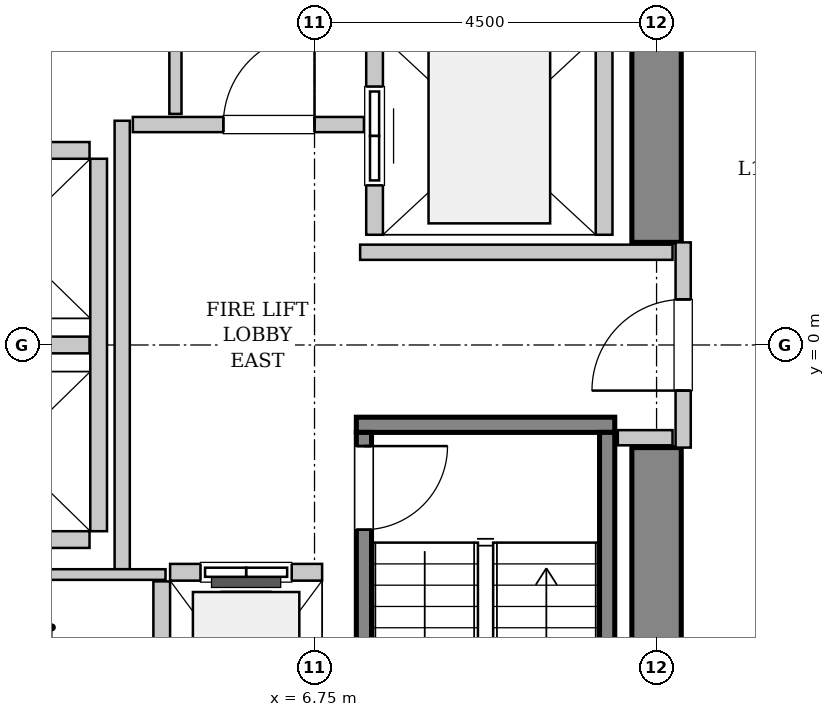
"""IFC4 building model, lengths in metres.
Left out: names, types, materials, properties, quantities, classifications, styles, units other than length and angle.
Written with IfcOpenShell. Run it as: python <this file> out.ifc"""

import sys

from ifc_helpers import new_model, si_unit, direction, frame, frame_2d, origin, place, context, subcontext, project, spatial, rectangle, extrude, source, transform, mapped, element, fill, save


model = new_model("IFC4")
c1 = context("Model", 3, precision=1e-05, world=origin(), true_north=direction((0.0, 1.0)))
c2 = subcontext(c1, "Body", "Model", "MODEL_VIEW")
j1 = project(units=[si_unit("LENGTHUNIT", "METRE"), si_unit("PLANEANGLEUNIT", "RADIAN")], contexts=[c1])
p1 = place(None, origin())
s1 = spatial("IfcSite", under=j1, at=p1, CompositionType="ELEMENT")
p2 = place(p1, origin())
s2 = spatial("IfcBuilding", under=s1, at=p2, CompositionType="ELEMENT")
p3 = place(p2, frame((0.0, 0.0, 71.0)))
s3 = spatial("IfcBuildingStorey", under=s2, at=p3, CompositionType="ELEMENT", Elevation=71.0)
m1 = source(origin(), c2, "Body", "SweptSolid", [
    extrude(rectangle(XDim=7.325, YDim=0.65, at=frame_2d((3.663, 0.0))), origin(), (0.0, 0.0, 1.0), 3.8),
])
for number, where, z_axis, x_axis in (
    (1, (11.25, -8.675, 0.0), (0.0, 0.0, 1.0), (0.0, 1.0, 0.0)),
    (2, (11.25, 1.35, 0.0), (0.0, 0.0, 1.0), (0.0, 1.0, 0.0)),
):
    element("IfcWall", number, at=place(p3, frame(where, z_axis=z_axis, x_axis=x_axis)), inside=s3, PredefinedType="SHEAR", context=c2, shape_type="MappedRepresentation", body=[
        mapped(m1, transform((0.0, 0.0, 0.0), x_axis=(1.0, 0.0, 0.0), y_axis=(0.0, 1.0, 0.0), z_axis=(0.0, 0.0, 1.0), scale=1.0)),
    ])
m2 = source(origin(), c2, "Body", "SweptSolid", [
    extrude(rectangle(XDim=3.4, YDim=0.2, at=frame_2d((1.7, 0.0))), origin(), (0.0, 0.0, 1.0), 3.8),
])
p4 = place(p3, frame((7.3, -1.05, 0.0), z_axis=(0.0, 0.0, 1.0), x_axis=(1.0, 0.0, 0.0)))
e3 = element("IfcWall", 3, at=p4, inside=s3, PredefinedType="SOLIDWALL", context=c2, shape_type="MappedRepresentation", body=[
    mapped(m2, transform((0.0, 0.0, 0.0), x_axis=(1.0, 0.0, 0.0), y_axis=(0.0, 1.0, 0.0), z_axis=(0.0, 0.0, 1.0), scale=1.0)),
])
m3 = source(origin(), c2, "Body", "SweptSolid", [
    extrude(rectangle(XDim=7.1, YDim=0.2, at=frame_2d((3.55, 0.0))), origin(), (0.0, 0.0, 1.0), 3.8),
])
p5 = place(p3, frame((7.4, -1.15, 0.0), z_axis=(0.0, 0.0, 1.0), x_axis=(0.0, -1.0, 0.0)))
e4 = element("IfcWall", 4, at=p5, inside=s3, PredefinedType="SOLIDWALL", context=c2, shape_type="MappedRepresentation", body=[
    mapped(m3, transform((0.0, 0.0, 0.0), x_axis=(1.0, 0.0, 0.0), y_axis=(0.0, 1.0, 0.0), z_axis=(0.0, 0.0, 1.0), scale=1.0)),
])
p6 = place(p5, frame((0.18, 0.0, 0.0)))
e5 = element("IfcOpeningElement", 5, at=p6, cuts=e4, PredefinedType="OPENING", context=c2, shape_type="SweptSolid", body=[
    extrude(rectangle(XDim=1.1, YDim=2.15, at=frame_2d((0.55, 1.075))), frame((0.0, 0.11, 0.0), z_axis=(0.0, -1.0, 0.0), x_axis=(1.0, 0.0, 0.0)), (0.0, 0.0, 1.0), 0.22),
])
p7 = place(p3, frame((10.6, -1.15, 0.0), z_axis=(0.0, 0.0, 1.0), x_axis=(0.0, -1.0, 0.0)))
e6 = element("IfcWall", 6, at=p7, inside=s3, PredefinedType="SOLIDWALL", context=c2, shape_type="MappedRepresentation", body=[
    mapped(m3, transform((0.0, 0.0, 0.0), x_axis=(1.0, 0.0, 0.0), y_axis=(0.0, 1.0, 0.0), z_axis=(0.0, 0.0, 1.0), scale=1.0)),
])
m4 = source(origin(), c2, "Body", "SweptSolid", [
    extrude(rectangle(XDim=2.0, YDim=0.22, at=frame_2d((1.0, 0.0))), origin(), (0.0, 0.0, 1.0), 3.535),
])
p8 = place(p3, frame((6.85, -2.99, 0.0), z_axis=(0.0, 0.0, 1.0), x_axis=(-1.0, 0.0, 0.0)))
e7 = element("IfcWall", 7, at=p8, inside=s3, PredefinedType="SOLIDWALL", context=c2, shape_type="MappedRepresentation", body=[
    mapped(m4, transform((0.0, 0.0, 0.0), x_axis=(1.0, 0.0, 0.0), y_axis=(0.0, 1.0, 0.0), z_axis=(0.0, 0.0, 1.0), scale=1.0)),
])
p9 = place(p8, frame((0.4, 0.0, 0.0)))
e8 = element("IfcOpeningElement", 8, at=p9, cuts=e7, PredefinedType="OPENING", context=c2, shape_type="SweptSolid", body=[
    extrude(rectangle(XDim=1.2, YDim=2.2, at=frame_2d((0.6, 1.1))), frame((0.0, 0.12, 0.0), z_axis=(0.0, -1.0, 0.0), x_axis=(1.0, 0.0, 0.0)), (0.0, 0.0, 1.0), 0.24),
])
m5 = source(origin(), c2, "Body", "SweptSolid", [
    extrude(rectangle(XDim=2.68, YDim=0.22, at=frame_2d((1.34, 0.0))), origin(), (0.0, 0.0, 1.0), 3.535),
])
p10 = place(p3, frame((4.74, -3.11, 0.0), z_axis=(0.0, 0.0, 1.0), x_axis=(0.0, -1.0, 0.0)))
e9 = element("IfcWall", 9, at=p10, inside=s3, PredefinedType="SOLIDWALL", context=c2, shape_type="MappedRepresentation", body=[
    mapped(m5, transform((0.0, 0.0, 0.0), x_axis=(1.0, 0.0, 0.0), y_axis=(0.0, 1.0, 0.0), z_axis=(0.0, 0.0, 1.0), scale=1.0)),
])
m6 = source(origin(), c2, "Body", "SweptSolid", [
    extrude(rectangle(XDim=5.45, YDim=0.22, at=frame_2d((2.725, 0.0))), origin(), (0.0, 0.0, 1.0), 3.535),
])
p11 = place(p3, frame((7.54, 6.9, 0.0), z_axis=(0.0, 0.0, 1.0), x_axis=(0.0, -1.0, 0.0)))
e10 = element("IfcWall", 10, at=p11, inside=s3, PredefinedType="SOLIDWALL", context=c2, shape_type="MappedRepresentation", body=[
    mapped(m6, transform((0.0, 0.0, 0.0), x_axis=(1.0, 0.0, 0.0), y_axis=(0.0, 1.0, 0.0), z_axis=(0.0, 0.0, 1.0), scale=1.0)),
])
p12 = place(p11, frame((3.5, 0.0, 0.0)))
e11 = element("IfcOpeningElement", 11, at=p12, cuts=e10, PredefinedType="OPENING", context=c2, shape_type="SweptSolid", body=[
    extrude(rectangle(XDim=1.3, YDim=2.3, at=frame_2d((0.65, 1.15))), frame((0.0, 0.12, 0.0), z_axis=(0.0, -1.0, 0.0), x_axis=(1.0, 0.0, 0.0)), (0.0, 0.0, 1.0), 0.24),
])
p13 = place(p11, frame((0.65, 0.0, 0.0)))
e12 = element("IfcOpeningElement", 12, at=p13, cuts=e10, PredefinedType="OPENING", context=c2, shape_type="SweptSolid", body=[
    extrude(rectangle(XDim=1.3, YDim=2.3, at=frame_2d((0.65, 1.15))), frame((0.0, 0.12, 0.0), z_axis=(0.0, -1.0, 0.0), x_axis=(1.0, 0.0, 0.0)), (0.0, 0.0, 1.0), 0.24),
])
p14 = place(p3, frame((10.56, 1.45, 0.0), z_axis=(0.0, 0.0, 1.0), x_axis=(0.0, 1.0, 0.0)))
e13 = element("IfcWall", 13, at=p14, inside=s3, PredefinedType="SOLIDWALL", context=c2, shape_type="MappedRepresentation", body=[
    mapped(m6, transform((0.0, 0.0, 0.0), x_axis=(1.0, 0.0, 0.0), y_axis=(0.0, 1.0, 0.0), z_axis=(0.0, 0.0, 1.0), scale=1.0)),
])
m7 = source(origin(), c2, "Body", "SweptSolid", [
    extrude(rectangle(XDim=4.9, YDim=0.22, at=frame_2d((2.45, 0.0))), origin(), (0.0, 0.0, 1.0), 3.535),
])
p15 = place(p3, frame((3.91, -2.45, 0.0), z_axis=(0.0, 0.0, 1.0), x_axis=(0.0, 1.0, 0.0)))
e14 = element("IfcWall", 14, at=p15, inside=s3, PredefinedType="SOLIDWALL", context=c2, shape_type="MappedRepresentation", body=[
    mapped(m7, transform((0.0, 0.0, 0.0), x_axis=(1.0, 0.0, 0.0), y_axis=(0.0, 1.0, 0.0), z_axis=(0.0, 0.0, 1.0), scale=1.0)),
])
m8 = source(origin(), c2, "Body", "SweptSolid", [
    extrude(rectangle(XDim=2.13, YDim=0.22, at=frame_2d((1.065, 0.0))), origin(), (0.0, 0.0, 1.0), 3.535),
])
for number, where, z_axis, x_axis in (
    (15, (1.66, -2.56, 0.0), (0.0, 0.0, 1.0), (1.0, 0.0, 0.0)),
    (16, (1.66, 0.0, 0.0), (0.0, 0.0, 1.0), (1.0, 0.0, 0.0)),
    (17, (3.79, 2.56, 0.0), (0.0, 0.0, 1.0), (-1.0, 0.0, 0.0)),
):
    element("IfcWall", number, at=place(p3, frame(where, z_axis=z_axis, x_axis=x_axis)), inside=s3, PredefinedType="SOLIDWALL", context=c2, shape_type="MappedRepresentation", body=[
        mapped(m8, transform((0.0, 0.0, 0.0), x_axis=(1.0, 0.0, 0.0), y_axis=(0.0, 1.0, 0.0), z_axis=(0.0, 0.0, 1.0), scale=1.0)),
    ])
m9 = source(origin(), c2, "Body", "SweptSolid", [
    extrude(rectangle(XDim=2.7, YDim=0.2, at=frame_2d((1.35, 0.0))), origin(), (0.0, 0.0, 1.0), 2.425),
])
p16 = place(p3, frame((11.6, -1.35, 0.0), z_axis=(0.0, 0.0, 1.0), x_axis=(0.0, 1.0, 0.0)))
e18 = element("IfcWall", 18, at=p16, inside=s3, PredefinedType="PARTITIONING", context=c2, shape_type="MappedRepresentation", body=[
    mapped(m9, transform((0.0, 0.0, 0.0), x_axis=(1.0, 0.0, 0.0), y_axis=(0.0, 1.0, 0.0), z_axis=(0.0, 0.0, 1.0), scale=1.0)),
])
p17 = place(p16, frame((0.75, 0.0, 0.0)))
e19 = element("IfcOpeningElement", 19, at=p17, cuts=e18, PredefinedType="OPENING", context=c2, shape_type="SweptSolid", body=[
    extrude(rectangle(XDim=1.2, YDim=2.15, at=frame_2d((0.6, 1.075))), frame((0.0, 0.11, 0.0), z_axis=(0.0, -1.0, 0.0), x_axis=(1.0, 0.0, 0.0)), (0.0, 0.0, 1.0), 0.22),
])
m10 = source(origin(), c2, "Body", "SweptSolid", [
    extrude(rectangle(XDim=5.9, YDim=0.2, at=frame_2d((2.95, 0.0))), origin(), (0.0, 0.0, 1.0), 3.535),
])
p18 = place(p3, frame((4.22, -2.95, 0.0), z_axis=(0.0, 0.0, 1.0), x_axis=(0.0, 1.0, 0.0)))
e20 = element("IfcWall", 20, at=p18, inside=s3, PredefinedType="PARTITIONING", context=c2, shape_type="MappedRepresentation", body=[
    mapped(m10, transform((0.0, 0.0, 0.0), x_axis=(1.0, 0.0, 0.0), y_axis=(0.0, 1.0, 0.0), z_axis=(0.0, 0.0, 1.0), scale=1.0)),
])
m11 = source(origin(), c2, "Body", "SweptSolid", [
    extrude(rectangle(XDim=3.04, YDim=0.2, at=frame_2d((1.52, 0.0))), origin(), (0.0, 0.0, 1.0), 3.535),
])
p19 = place(p3, frame((4.36, 2.9, 0.0), z_axis=(0.0, 0.0, 1.0), x_axis=(1.0, 0.0, 0.0)))
e21 = element("IfcWall", 21, at=p19, inside=s3, PredefinedType="PARTITIONING", context=c2, shape_type="MappedRepresentation", body=[
    mapped(m11, transform((0.0, 0.0, 0.0), x_axis=(1.0, 0.0, 0.0), y_axis=(0.0, 1.0, 0.0), z_axis=(0.0, 0.0, 1.0), scale=1.0)),
])
p20 = place(p19, frame((1.19, 0.0, 0.0)))
e22 = element("IfcOpeningElement", 22, at=p20, cuts=e21, PredefinedType="OPENING", context=c2, shape_type="SweptSolid", body=[
    extrude(rectangle(XDim=1.2, YDim=2.15, at=frame_2d((0.6, 1.075))), frame((0.0, 0.11, 0.0), z_axis=(0.0, -1.0, 0.0), x_axis=(1.0, 0.0, 0.0)), (0.0, 0.0, 1.0), 0.22),
])
m12 = source(origin(), c2, "Body", "SweptSolid", [
    extrude(rectangle(XDim=4.11, YDim=0.2, at=frame_2d((2.055, 0.0))), origin(), (0.0, 0.0, 1.0), 3.535),
])
p21 = place(p3, frame((7.35, 1.22, 0.0), z_axis=(0.0, 0.0, 1.0), x_axis=(1.0, 0.0, 0.0)))
e23 = element("IfcWall", 23, at=p21, inside=s3, PredefinedType="PARTITIONING", context=c2, shape_type="MappedRepresentation", body=[
    mapped(m12, transform((0.0, 0.0, 0.0), x_axis=(1.0, 0.0, 0.0), y_axis=(0.0, 1.0, 0.0), z_axis=(0.0, 0.0, 1.0), scale=1.0)),
])
m13 = source(origin(), c2, "Body", "SweptSolid", [
    extrude(rectangle(XDim=0.72, YDim=0.2, at=frame_2d((0.36, 0.0))), origin(), (0.0, 0.0, 1.0), 3.535),
])
p22 = place(p3, frame((10.74, -1.22, 0.0), z_axis=(0.0, 0.0, 1.0), x_axis=(1.0, 0.0, 0.0)))
e24 = element("IfcWall", 24, at=p22, inside=s3, PredefinedType="PARTITIONING", context=c2, shape_type="MappedRepresentation", body=[
    mapped(m13, transform((0.0, 0.0, 0.0), x_axis=(1.0, 0.0, 0.0), y_axis=(0.0, 1.0, 0.0), z_axis=(0.0, 0.0, 1.0), scale=1.0)),
])
m14 = source(origin(), c2, "Body", "SweptSolid", [
    extrude(rectangle(XDim=3.015, YDim=0.16, at=frame_2d((1.507, 0.0))), origin(), (0.0, 0.0, 1.0), 3.535),
])
p23 = place(p3, frame((4.92, 3.04, 0.0), z_axis=(0.0, 0.0, 1.0), x_axis=(0.0, 1.0, 0.0)))
e25 = element("IfcWall", 25, at=p23, inside=s3, PredefinedType="PARTITIONING", context=c2, shape_type="MappedRepresentation", body=[
    mapped(m14, transform((0.0, 0.0, 0.0), x_axis=(1.0, 0.0, 0.0), y_axis=(0.0, 1.0, 0.0), z_axis=(0.0, 0.0, 1.0), scale=1.0)),
])
m15 = source(origin(), c2, "Body", "SweptSolid", [
    extrude(rectangle(XDim=3.15, YDim=0.14, at=frame_2d((1.575, 0.0))), origin(), (0.0, 0.0, 1.0), 3.535),
])
p24 = place(p3, frame((1.64, -3.02, 0.0), z_axis=(0.0, 0.0, 1.0), x_axis=(1.0, 0.0, 0.0)))
e26 = element("IfcWall", 26, at=p24, inside=s3, PredefinedType="PARTITIONING", context=c2, shape_type="MappedRepresentation", body=[
    mapped(m15, transform((0.0, 0.0, 0.0), x_axis=(1.0, 0.0, 0.0), y_axis=(0.0, 1.0, 0.0), z_axis=(0.0, 0.0, 1.0), scale=1.0)),
])
m16 = source(origin(), c2, "Body", "SweptSolid", [
    extrude(rectangle(XDim=1.1, YDim=2.15, at=frame_2d((0.55, 1.075))), frame((0.0, 0.025, 0.0), z_axis=(0.0, -1.0, 0.0), x_axis=(1.0, 0.0, 0.0)), (0.0, 0.0, 1.0), 0.05),
])
p25 = place(p6, origin())
e27 = element("IfcDoor", 27, at=p25, inside=s3, OperationType="SINGLE_SWING_LEFT", PredefinedType="DOOR", context=c2, shape_type="MappedRepresentation", body=[
    mapped(m16, transform((0.0, 0.0, 0.0), x_axis=(1.0, 0.0, 0.0), y_axis=(0.0, 1.0, 0.0), z_axis=(0.0, 0.0, 1.0), scale=1.0)),
])
fill(e5, e27)
m17 = source(origin(), c2, "Body", "SweptSolid", [
    extrude(rectangle(XDim=1.2, YDim=2.2, at=frame_2d((0.6, 1.1))), frame((0.0, 0.025, 0.0), z_axis=(0.0, -1.0, 0.0), x_axis=(1.0, 0.0, 0.0)), (0.0, 0.0, 1.0), 0.05),
])
p26 = place(p9, origin())
e28 = element("IfcDoor", 28, at=p26, inside=s3, OperationType="SLIDING_TO_LEFT", PredefinedType="DOOR", context=c2, shape_type="MappedRepresentation", body=[
    mapped(m17, transform((0.0, 0.0, 0.0), x_axis=(1.0, 0.0, 0.0), y_axis=(0.0, 1.0, 0.0), z_axis=(0.0, 0.0, 1.0), scale=1.0)),
])
fill(e8, e28)
m18 = source(origin(), c2, "Body", "SweptSolid", [
    extrude(rectangle(XDim=1.3, YDim=2.3, at=frame_2d((0.65, 1.15))), frame((0.0, 0.025, 0.0), z_axis=(0.0, -1.0, 0.0), x_axis=(1.0, 0.0, 0.0)), (0.0, 0.0, 1.0), 0.05),
])
p27 = place(p12, origin())
e29 = element("IfcDoor", 29, at=p27, inside=s3, OperationType="SLIDING_TO_RIGHT", PredefinedType="DOOR", context=c2, shape_type="MappedRepresentation", body=[
    mapped(m18, transform((0.0, 0.0, 0.0), x_axis=(1.0, 0.0, 0.0), y_axis=(0.0, 1.0, 0.0), z_axis=(0.0, 0.0, 1.0), scale=1.0)),
])
fill(e11, e29)
m19 = source(origin(), c2, "Body", "SweptSolid", [
    extrude(rectangle(XDim=1.2, YDim=2.15, at=frame_2d((0.6, 1.075))), frame((0.0, 0.025, 0.0), z_axis=(0.0, -1.0, 0.0), x_axis=(1.0, 0.0, 0.0)), (0.0, 0.0, 1.0), 0.05),
])
p28 = place(p17, origin())
e30 = element("IfcDoor", 30, at=p28, inside=s3, OperationType="SINGLE_SWING_LEFT", PredefinedType="DOOR", context=c2, shape_type="MappedRepresentation", body=[
    mapped(m19, transform((0.0, 0.0, 0.0), x_axis=(1.0, 0.0, 0.0), y_axis=(0.0, 1.0, 0.0), z_axis=(0.0, 0.0, 1.0), scale=1.0)),
])
fill(e19, e30)
p29 = place(p20, origin())
e31 = element("IfcDoor", 31, at=p29, inside=s3, OperationType="SINGLE_SWING_RIGHT", PredefinedType="DOOR", context=c2, shape_type="MappedRepresentation", body=[
    mapped(m19, transform((0.0, 0.0, 0.0), x_axis=(1.0, 0.0, 0.0), y_axis=(0.0, 1.0, 0.0), z_axis=(0.0, 0.0, 1.0), scale=1.0)),
])
fill(e22, e31)
save(model, sys.argv[1])
